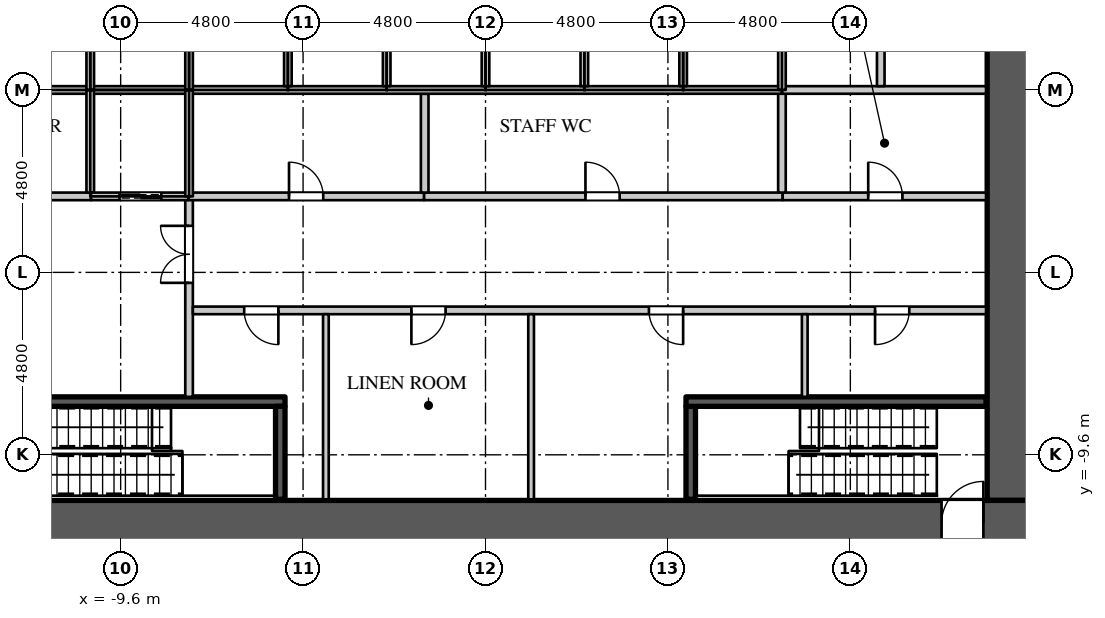
"""IFC4 building model, lengths in metres.
Left out: names, types, materials, properties, quantities, classifications, styles, units other than length and angle.
Written with IfcOpenShell. Run it as: python <this file> out.ifc"""

import sys

from ifc_helpers import new_model, si_unit, direction, frame, frame_2d, origin, place, context, subcontext, project, spatial, rectangle, extrude, element, fill, save


model = new_model("IFC4")
c1 = context("Model", 3, precision=1e-05, world=origin(), true_north=direction((0.0, 1.0)))
c2 = subcontext(c1, "Body", "Model", "MODEL_VIEW")
j1 = project(units=[si_unit("LENGTHUNIT", "METRE"), si_unit("PLANEANGLEUNIT", "RADIAN")], contexts=[c1])
p1 = place(None, origin())
s1 = spatial("IfcSite", under=j1, at=p1, CompositionType="ELEMENT")
p2 = place(p1, origin())
s2 = spatial("IfcBuilding", under=s1, at=p2, CompositionType="ELEMENT")
p3 = place(p2, frame((0.0, 0.0, -9.0)))
s3 = spatial("IfcBuildingStorey", under=s2, at=p3, CompositionType="ELEMENT", Elevation=-9.0)
p4 = place(p3, frame((-14.4, -11.4, 0.0), z_axis=(0.0, 0.0, 1.0), x_axis=(1.0, 0.0, 0.0)))
e1 = element("IfcWall", 1, at=p4, inside=s3, PredefinedType="SHEAR", context=c2, shape_type="SweptSolid", body=[
    extrude(rectangle(XDim=28.8, YDim=1.2, at=frame_2d((14.4, 0.0))), origin(), (0.0, 0.0, 1.0), 4.5),
])
p5 = place(p4, frame((1.3, 0.0, 0.0)))
e2 = element("IfcOpeningElement", 2, at=p5, cuts=e1, PredefinedType="OPENING", context=c2, shape_type="SweptSolid", body=[
    extrude(rectangle(XDim=1.1, YDim=2.2, at=frame_2d((0.55, 1.1))), frame((0.0, 0.61, 0.0), z_axis=(0.0, -1.0, 0.0), x_axis=(1.0, 0.0, 0.0)), (0.0, 0.0, 1.0), 1.22),
])
p6 = place(p4, frame((26.4, 0.0, 0.0)))
e3 = element("IfcOpeningElement", 3, at=p6, cuts=e1, PredefinedType="OPENING", context=c2, shape_type="SweptSolid", body=[
    extrude(rectangle(XDim=1.1, YDim=2.2, at=frame_2d((0.55, 1.1))), frame((0.0, 0.61, 0.0), z_axis=(0.0, -1.0, 0.0), x_axis=(1.0, 0.0, 0.0)), (0.0, 0.0, 1.0), 1.22),
])
p7 = place(p3, frame((13.8, -10.8, 0.0), z_axis=(0.0, 0.0, 1.0), x_axis=(0.0, 1.0, 0.0)))
e4 = element("IfcWall", 4, at=p7, inside=s3, PredefinedType="SHEAR", context=c2, shape_type="SweptSolid", body=[
    extrude(rectangle(XDim=21.6, YDim=1.2, at=frame_2d((10.8, 0.0))), origin(), (0.0, 0.0, 1.0), 4.5),
])
p8 = place(p7, frame((14.35, 0.0, 0.0)))
e5 = element("IfcOpeningElement", 5, at=p8, cuts=e4, PredefinedType="OPENING", context=c2, shape_type="SweptSolid", body=[
    extrude(rectangle(XDim=1.5, YDim=2.4, at=frame_2d((0.75, 1.2))), frame((0.0, 0.61, 0.0), z_axis=(0.0, -1.0, 0.0), x_axis=(1.0, 0.0, 0.0)), (0.0, 0.0, 1.0), 1.22),
])
p9 = place(p3, frame((-7.8, -8.075, 0.0), z_axis=(0.0, 0.0, 1.0), x_axis=(0.0, 1.0, 0.0)))
e6 = element("IfcWall", 6, at=p9, inside=s3, PredefinedType="PARTITIONING", context=c2, shape_type="SweptSolid", body=[
    extrude(rectangle(XDim=5.275, YDim=0.2, at=frame_2d((2.637, 0.0))), origin(), (0.0, 0.0, 1.0), 4.048),
])
p10 = place(p9, frame((3.0, 0.0, 0.0)))
e7 = element("IfcOpeningElement", 7, at=p10, cuts=e6, PredefinedType="OPENING", context=c2, shape_type="SweptSolid", body=[
    extrude(rectangle(XDim=1.5, YDim=2.4, at=frame_2d((0.75, 1.2))), frame((0.0, 0.11, 0.0), z_axis=(0.0, -1.0, 0.0), x_axis=(1.0, 0.0, 0.0)), (0.0, 0.0, 1.0), 0.22),
])
p11 = place(p3, frame((-7.7, -5.8, 0.0), z_axis=(0.0, 0.0, 1.0), x_axis=(1.0, 0.0, 0.0)))
e8 = element("IfcWall", 8, at=p11, inside=s3, PredefinedType="PARTITIONING", context=c2, shape_type="SweptSolid", body=[
    extrude(rectangle(XDim=20.87, YDim=0.2, at=frame_2d((10.435, 0.0))), origin(), (0.0, 0.0, 1.0), 4.048),
])
p12 = place(p11, frame((1.35, 0.0, 0.0)))
e9 = element("IfcOpeningElement", 9, at=p12, cuts=e8, PredefinedType="OPENING", context=c2, shape_type="SweptSolid", body=[
    extrude(rectangle(XDim=0.9, YDim=2.2, at=frame_2d((0.45, 1.1))), frame((0.0, 0.11, 0.0), z_axis=(0.0, -1.0, 0.0), x_axis=(1.0, 0.0, 0.0)), (0.0, 0.0, 1.0), 0.22),
])
p13 = place(p11, frame((5.75, 0.0, 0.0)))
e10 = element("IfcOpeningElement", 10, at=p13, cuts=e8, PredefinedType="OPENING", context=c2, shape_type="SweptSolid", body=[
    extrude(rectangle(XDim=0.9, YDim=2.2, at=frame_2d((0.45, 1.1))), frame((0.0, 0.11, 0.0), z_axis=(0.0, -1.0, 0.0), x_axis=(1.0, 0.0, 0.0)), (0.0, 0.0, 1.0), 0.22),
])
p14 = place(p11, frame((12.0, 0.0, 0.0)))
e11 = element("IfcOpeningElement", 11, at=p14, cuts=e8, PredefinedType="OPENING", context=c2, shape_type="SweptSolid", body=[
    extrude(rectangle(XDim=0.9, YDim=2.2, at=frame_2d((0.45, 1.1))), frame((0.0, 0.11, 0.0), z_axis=(0.0, -1.0, 0.0), x_axis=(1.0, 0.0, 0.0)), (0.0, 0.0, 1.0), 0.22),
])
p15 = place(p11, frame((17.95, 0.0, 0.0)))
e12 = element("IfcOpeningElement", 12, at=p15, cuts=e8, PredefinedType="OPENING", context=c2, shape_type="SweptSolid", body=[
    extrude(rectangle(XDim=0.9, YDim=2.2, at=frame_2d((0.45, 1.1))), frame((0.0, 0.11, 0.0), z_axis=(0.0, -1.0, 0.0), x_axis=(1.0, 0.0, 0.0)), (0.0, 0.0, 1.0), 0.22),
])
p16 = place(p3, frame((-1.62, -2.8, 0.0), z_axis=(0.0, 0.0, 1.0), x_axis=(1.0, 0.0, 0.0)))
e13 = element("IfcWall", 13, at=p16, inside=s3, PredefinedType="PARTITIONING", context=c2, shape_type="SweptSolid", body=[
    extrude(rectangle(XDim=9.44, YDim=0.2, at=frame_2d((4.72, 0.0))), origin(), (0.0, 0.0, 1.0), 4.048),
])
p17 = place(p16, frame((4.25, 0.0, 0.0)))
e14 = element("IfcOpeningElement", 14, at=p17, cuts=e13, PredefinedType="OPENING", context=c2, shape_type="SweptSolid", body=[
    extrude(rectangle(XDim=0.9, YDim=2.2, at=frame_2d((0.45, 1.1))), frame((0.0, 0.11, 0.0), z_axis=(0.0, -1.0, 0.0), x_axis=(1.0, 0.0, 0.0)), (0.0, 0.0, 1.0), 0.22),
])
for number, where, z_axis, x_axis in (
    (15, (-4.2, -10.77, 0.0), (0.0, 0.0, 1.0), (0.0, 1.0, 0.0)),
    (16, (1.2, -10.77, 0.0), (0.0, 0.0, 1.0), (0.0, 1.0, 0.0)),
):
    element("IfcWall", number, at=place(p3, frame(where, z_axis=z_axis, x_axis=x_axis)), inside=s3, PredefinedType="PARTITIONING", context=c2, shape_type="SweptSolid", body=[
        extrude(rectangle(XDim=4.87, YDim=0.15, at=frame_2d((2.435, 0.0))), origin(), (0.0, 0.0, 1.0), 4.048),
    ])
p18 = place(p3, frame((8.4, -8.075, 0.0), z_axis=(0.0, 0.0, 1.0), x_axis=(0.0, 1.0, 0.0)))
e17 = element("IfcWall", 17, at=p18, inside=s3, PredefinedType="PARTITIONING", context=c2, shape_type="SweptSolid", body=[
    extrude(rectangle(XDim=2.175, YDim=0.15, at=frame_2d((1.087, 0.0))), origin(), (0.0, 0.0, 1.0), 4.048),
])
p19 = place(p3, frame((-13.17, -2.8, 0.0), z_axis=(0.0, 0.0, 1.0), x_axis=(1.0, 0.0, 0.0)))
e18 = element("IfcWall", 18, at=p19, inside=s3, PredefinedType="PARTITIONING", context=c2, shape_type="SweptSolid", body=[
    extrude(rectangle(XDim=2.79, YDim=0.2, at=frame_2d((1.395, 0.0))), origin(), (0.0, 0.0, 1.0), 4.048),
])
p20 = place(p19, frame((1.05, 0.0, 0.0)))
e19 = element("IfcOpeningElement", 19, at=p20, cuts=e18, PredefinedType="OPENING", context=c2, shape_type="SweptSolid", body=[
    extrude(rectangle(XDim=0.6, YDim=2.0, at=frame_2d((0.3, 1.0))), frame((0.0, 0.11, 0.0), z_axis=(0.0, -1.0, 0.0), x_axis=(1.0, 0.0, 0.0)), (0.0, 0.0, 1.0), 0.22),
])
p21 = place(p3, frame((-7.82, -2.8, 0.0), z_axis=(0.0, 0.0, 1.0), x_axis=(1.0, 0.0, 0.0)))
e20 = element("IfcWall", 20, at=p21, inside=s3, PredefinedType="PARTITIONING", context=c2, shape_type="SweptSolid", body=[
    extrude(rectangle(XDim=6.2, YDim=0.2, at=frame_2d((3.1, 0.0))), origin(), (0.0, 0.0, 1.0), 4.048),
])
p22 = place(p21, frame((2.65, 0.0, 0.0)))
e21 = element("IfcOpeningElement", 21, at=p22, cuts=e20, PredefinedType="OPENING", context=c2, shape_type="SweptSolid", body=[
    extrude(rectangle(XDim=0.9, YDim=2.2, at=frame_2d((0.45, 1.1))), frame((0.0, 0.11, 0.0), z_axis=(0.0, -1.0, 0.0), x_axis=(1.0, 0.0, 0.0)), (0.0, 0.0, 1.0), 0.22),
])
p23 = place(p3, frame((-1.6, -2.7, 0.0), z_axis=(0.0, 0.0, 1.0), x_axis=(0.0, 1.0, 0.0)))
e22 = element("IfcWall", 22, at=p23, inside=s3, PredefinedType="PARTITIONING", context=c2, shape_type="SweptSolid", body=[
    extrude(rectangle(XDim=2.6, YDim=0.2, at=frame_2d((1.3, 0.0))), origin(), (0.0, 0.0, 1.0), 4.048),
])
p24 = place(p3, frame((7.82, -2.8, 0.0), z_axis=(0.0, 0.0, 1.0), x_axis=(1.0, 0.0, 0.0)))
e23 = element("IfcWall", 23, at=p24, inside=s3, PredefinedType="PARTITIONING", context=c2, shape_type="SweptSolid", body=[
    extrude(rectangle(XDim=5.35, YDim=0.2, at=frame_2d((2.675, 0.0))), origin(), (0.0, 0.0, 1.0), 4.048),
])
p25 = place(p24, frame((2.25, 0.0, 0.0)))
e24 = element("IfcOpeningElement", 24, at=p25, cuts=e23, PredefinedType="OPENING", context=c2, shape_type="SweptSolid", body=[
    extrude(rectangle(XDim=0.9, YDim=2.2, at=frame_2d((0.45, 1.1))), frame((0.0, 0.11, 0.0), z_axis=(0.0, -1.0, 0.0), x_axis=(1.0, 0.0, 0.0)), (0.0, 0.0, 1.0), 0.22),
])
p26 = place(p3, frame((7.8, -2.7, 0.0), z_axis=(0.0, 0.0, 1.0), x_axis=(0.0, 1.0, 0.0)))
e25 = element("IfcWall", 25, at=p26, inside=s3, PredefinedType="PARTITIONING", context=c2, shape_type="SweptSolid", body=[
    extrude(rectangle(XDim=2.7, YDim=0.2, at=frame_2d((1.35, 0.0))), origin(), (0.0, 0.0, 1.0), 4.048),
])
p27 = place(p3, frame((7.8, 0.0, 0.0), z_axis=(0.0, 0.0, 1.0), x_axis=(1.0, 0.0, 0.0)))
e26 = element("IfcWall", 26, at=p27, inside=s3, PredefinedType="PARTITIONING", context=c2, shape_type="SweptSolid", body=[
    extrude(rectangle(XDim=5.37, YDim=0.2, at=frame_2d((2.685, 0.0))), origin(), (0.0, 0.0, 1.0), 4.048),
])
p28 = place(p3, frame((10.4, 0.1, 0.0), z_axis=(0.0, 0.0, 1.0), x_axis=(0.0, 1.0, 0.0)))
e27 = element("IfcWall", 27, at=p28, inside=s3, PredefinedType="PARTITIONING", context=c2, shape_type="SweptSolid", body=[
    extrude(rectangle(XDim=2.6, YDim=0.2, at=frame_2d((1.3, 0.0))), origin(), (0.0, 0.0, 1.0), 4.048),
])
p29 = place(p3, frame((-13.17, 0.0, 0.0), z_axis=(0.0, 0.0, 1.0), x_axis=(1.0, 0.0, 0.0)))
e28 = element("IfcWall", 28, at=p29, inside=s3, PredefinedType="PARTITIONING", context=c2, shape_type="SweptSolid", body=[
    extrude(rectangle(XDim=20.97, YDim=0.2, at=frame_2d((10.485, 0.0))), origin(), (0.0, 0.0, 1.0), 4.048),
])
p30 = place(p3, frame((-10.4, -2.7, 0.0), z_axis=(0.0, 0.0, 1.0), x_axis=(0.0, 1.0, 0.0)))
e29 = element("IfcWall", 29, at=p30, inside=s3, PredefinedType="PARTITIONING", context=c2, shape_type="SweptSolid", body=[
    extrude(rectangle(XDim=2.7, YDim=0.2, at=frame_2d((1.35, 0.0))), origin(), (0.0, 0.0, 1.0), 4.048),
])
p31 = place(p3, frame((-10.38, -2.8, 0.0), z_axis=(0.0, 0.0, 1.0), x_axis=(1.0, 0.0, 0.0)))
e30 = element("IfcWall", 30, at=p31, inside=s3, PredefinedType="PARTITIONING", context=c2, shape_type="SweptSolid", body=[
    extrude(rectangle(XDim=2.56, YDim=0.2, at=frame_2d((1.28, 0.0))), origin(), (0.0, 0.0, 1.0), 4.048),
])
p32 = place(p31, frame((0.75, 0.0, 0.0)))
e31 = element("IfcOpeningElement", 31, at=p32, cuts=e30, PredefinedType="OPENING", context=c2, shape_type="SweptSolid", body=[
    extrude(rectangle(XDim=1.1, YDim=2.2, at=frame_2d((0.55, 1.1))), frame((0.0, 0.11, 0.0), z_axis=(0.0, -1.0, 0.0), x_axis=(1.0, 0.0, 0.0)), (0.0, 0.0, 1.0), 0.22),
])
p33 = place(p3, frame((-10.4, 0.0, 0.0), z_axis=(0.0, 0.0, 1.0), x_axis=(0.0, 1.0, 0.0)))
e32 = element("IfcWall", 32, at=p33, inside=s3, PredefinedType="PARTITIONING", context=c2, shape_type="SweptSolid", body=[
    extrude(rectangle(XDim=2.7, YDim=0.2, at=frame_2d((1.35, 0.0))), origin(), (0.0, 0.0, 1.0), 4.048),
])
for number, where, z_axis, x_axis in (
    (33, (-7.8, -2.8, 0.0), (0.0, 0.0, 1.0), (0.0, 1.0, 0.0)),
    (34, (-7.8, 0.0, 0.0), (0.0, 0.0, 1.0), (0.0, 1.0, 0.0)),
):
    element("IfcWall", number, at=place(p3, frame(where, z_axis=z_axis, x_axis=x_axis)), inside=s3, PredefinedType="PARTITIONING", context=c2, shape_type="SweptSolid", body=[
        extrude(rectangle(XDim=2.8, YDim=0.2, at=frame_2d((1.4, 0.0))), origin(), (0.0, 0.0, 1.0), 4.048),
    ])
for number, where, z_axis, x_axis in (
    (35, (-5.2, 0.1, 0.0), (0.0, 0.0, 1.0), (0.0, 1.0, 0.0)),
    (36, (-2.6, 0.1, 0.0), (0.0, 0.0, 1.0), (0.0, 1.0, 0.0)),
    (37, (0.0, 0.1, 0.0), (0.0, 0.0, 1.0), (0.0, 1.0, 0.0)),
    (38, (2.6, 0.1, 0.0), (0.0, 0.0, 1.0), (0.0, 1.0, 0.0)),
    (39, (5.2, 0.1, 0.0), (0.0, 0.0, 1.0), (0.0, 1.0, 0.0)),
):
    element("IfcWall", number, at=place(p3, frame(where, z_axis=z_axis, x_axis=x_axis)), inside=s3, PredefinedType="PARTITIONING", context=c2, shape_type="SweptSolid", body=[
        extrude(rectangle(XDim=2.6, YDim=0.2, at=frame_2d((1.3, 0.0))), origin(), (0.0, 0.0, 1.0), 4.048),
    ])
p34 = place(p3, frame((7.8, 0.0, 0.0), z_axis=(0.0, 0.0, 1.0), x_axis=(0.0, 1.0, 0.0)))
e40 = element("IfcWall", 40, at=p34, inside=s3, PredefinedType="PARTITIONING", context=c2, shape_type="SweptSolid", body=[
    extrude(rectangle(XDim=2.7, YDim=0.2, at=frame_2d((1.35, 0.0))), origin(), (0.0, 0.0, 1.0), 4.048),
])
p35 = place(p3, frame((-13.17, -8.2, 0.0), z_axis=(0.0, 0.0, 1.0), x_axis=(1.0, 0.0, 0.0)))
e41 = element("IfcWall", 41, at=p35, inside=s3, PredefinedType="SHEAR", context=c2, shape_type="SweptSolid", body=[
    extrude(rectangle(XDim=7.895, YDim=0.25, at=frame_2d((3.948, 0.0))), origin(), (0.0, 0.0, 1.0), 4.048),
])
p36 = place(p35, frame((0.15, 0.0, 0.0)))
e42 = element("IfcOpeningElement", 42, at=p36, cuts=e41, PredefinedType="OPENING", context=c2, shape_type="SweptSolid", body=[
    extrude(rectangle(XDim=1.1, YDim=2.2, at=frame_2d((0.55, 1.1))), frame((0.0, 0.135, 0.0), z_axis=(0.0, -1.0, 0.0), x_axis=(1.0, 0.0, 0.0)), (0.0, 0.0, 1.0), 0.27),
])
for number, where, z_axis, x_axis in (
    (43, (-5.4, -10.77, 0.0), (0.0, 0.0, 1.0), (0.0, 1.0, 0.0)),
    (44, (5.4, -10.77, 0.0), (0.0, 0.0, 1.0), (0.0, 1.0, 0.0)),
):
    element("IfcWall", number, at=place(p3, frame(where, z_axis=z_axis, x_axis=x_axis)), inside=s3, PredefinedType="SHEAR", context=c2, shape_type="SweptSolid", body=[
        extrude(rectangle(XDim=2.445, YDim=0.25, at=frame_2d((1.223, 0.0))), origin(), (0.0, 0.0, 1.0), 4.048),
    ])
p37 = place(p3, frame((5.275, -8.2, 0.0), z_axis=(0.0, 0.0, 1.0), x_axis=(1.0, 0.0, 0.0)))
e45 = element("IfcWall", 45, at=p37, inside=s3, PredefinedType="SHEAR", context=c2, shape_type="SweptSolid", body=[
    extrude(rectangle(XDim=7.895, YDim=0.25, at=frame_2d((3.948, 0.0))), origin(), (0.0, 0.0, 1.0), 4.048),
])
p38 = place(p25, origin())
e46 = element("IfcDoor", 46, at=p38, inside=s3, OperationType="SINGLE_SWING_LEFT", PredefinedType="DOOR", context=c2, shape_type="SweptSolid", body=[
    extrude(rectangle(XDim=0.9, YDim=2.2, at=frame_2d((0.45, 1.1))), frame((0.0, 0.025, 0.0), z_axis=(0.0, -1.0, 0.0), x_axis=(1.0, 0.0, 0.0)), (0.0, 0.0, 1.0), 0.05),
])
fill(e24, e46)
p39 = place(p12, origin())
e47 = element("IfcDoor", 47, at=p39, inside=s3, OperationType="SINGLE_SWING_LEFT", PredefinedType="DOOR", context=c2, shape_type="SweptSolid", body=[
    extrude(rectangle(XDim=0.9, YDim=2.2, at=frame_2d((0.45, 1.1))), frame((0.0, 0.025, 0.0), z_axis=(0.0, -1.0, 0.0), x_axis=(1.0, 0.0, 0.0)), (0.0, 0.0, 1.0), 0.05),
])
fill(e9, e47)
p40 = place(p13, origin())
e48 = element("IfcDoor", 48, at=p40, inside=s3, OperationType="SINGLE_SWING_RIGHT", PredefinedType="DOOR", context=c2, shape_type="SweptSolid", body=[
    extrude(rectangle(XDim=0.9, YDim=2.2, at=frame_2d((0.45, 1.1))), frame((0.0, 0.025, 0.0), z_axis=(0.0, -1.0, 0.0), x_axis=(1.0, 0.0, 0.0)), (0.0, 0.0, 1.0), 0.05),
])
fill(e10, e48)
p41 = place(p14, origin())
e49 = element("IfcDoor", 49, at=p41, inside=s3, OperationType="SINGLE_SWING_LEFT", PredefinedType="DOOR", context=c2, shape_type="SweptSolid", body=[
    extrude(rectangle(XDim=0.9, YDim=2.2, at=frame_2d((0.45, 1.1))), frame((0.0, 0.025, 0.0), z_axis=(0.0, -1.0, 0.0), x_axis=(1.0, 0.0, 0.0)), (0.0, 0.0, 1.0), 0.05),
])
fill(e11, e49)
p42 = place(p15, origin())
e50 = element("IfcDoor", 50, at=p42, inside=s3, OperationType="SINGLE_SWING_RIGHT", PredefinedType="DOOR", context=c2, shape_type="SweptSolid", body=[
    extrude(rectangle(XDim=0.9, YDim=2.2, at=frame_2d((0.45, 1.1))), frame((0.0, 0.025, 0.0), z_axis=(0.0, -1.0, 0.0), x_axis=(1.0, 0.0, 0.0)), (0.0, 0.0, 1.0), 0.05),
])
fill(e12, e50)
p43 = place(p22, origin())
e51 = element("IfcDoor", 51, at=p43, inside=s3, OperationType="SINGLE_SWING_LEFT", PredefinedType="DOOR", context=c2, shape_type="SweptSolid", body=[
    extrude(rectangle(XDim=0.9, YDim=2.2, at=frame_2d((0.45, 1.1))), frame((0.0, 0.025, 0.0), z_axis=(0.0, -1.0, 0.0), x_axis=(1.0, 0.0, 0.0)), (0.0, 0.0, 1.0), 0.05),
])
fill(e21, e51)
p44 = place(p17, origin())
e52 = element("IfcDoor", 52, at=p44, inside=s3, OperationType="SINGLE_SWING_LEFT", PredefinedType="DOOR", context=c2, shape_type="SweptSolid", body=[
    extrude(rectangle(XDim=0.9, YDim=2.2, at=frame_2d((0.45, 1.1))), frame((0.0, 0.025, 0.0), z_axis=(0.0, -1.0, 0.0), x_axis=(1.0, 0.0, 0.0)), (0.0, 0.0, 1.0), 0.05),
])
fill(e14, e52)
p45 = place(p32, origin())
e53 = element("IfcDoor", 53, at=p45, inside=s3, OperationType="DOUBLE_DOOR_SLIDING", PredefinedType="DOOR", context=c2, shape_type="SweptSolid", body=[
    extrude(rectangle(XDim=1.1, YDim=2.2, at=frame_2d((0.55, 1.1))), frame((0.0, 0.025, 0.0), z_axis=(0.0, -1.0, 0.0), x_axis=(1.0, 0.0, 0.0)), (0.0, 0.0, 1.0), 0.05),
])
fill(e31, e53)
p46 = place(p10, origin())
e54 = element("IfcDoor", 54, at=p46, inside=s3, OperationType="DOUBLE_DOOR_SINGLE_SWING", PredefinedType="DOOR", context=c2, shape_type="SweptSolid", body=[
    extrude(rectangle(XDim=1.5, YDim=2.4, at=frame_2d((0.75, 1.2))), frame((0.0, 0.025, 0.0), z_axis=(0.0, -1.0, 0.0), x_axis=(1.0, 0.0, 0.0)), (0.0, 0.0, 1.0), 0.05),
])
fill(e7, e54)
p47 = place(p6, origin())
e55 = element("IfcDoor", 55, at=p47, inside=s3, OperationType="SINGLE_SWING_RIGHT", PredefinedType="DOOR", context=c2, shape_type="SweptSolid", body=[
    extrude(rectangle(XDim=1.1, YDim=2.2, at=frame_2d((0.55, 1.1))), frame((0.0, 0.025, 0.0), z_axis=(0.0, -1.0, 0.0), x_axis=(1.0, 0.0, 0.0)), (0.0, 0.0, 1.0), 0.05),
])
fill(e3, e55)
save(model, sys.argv[1])
